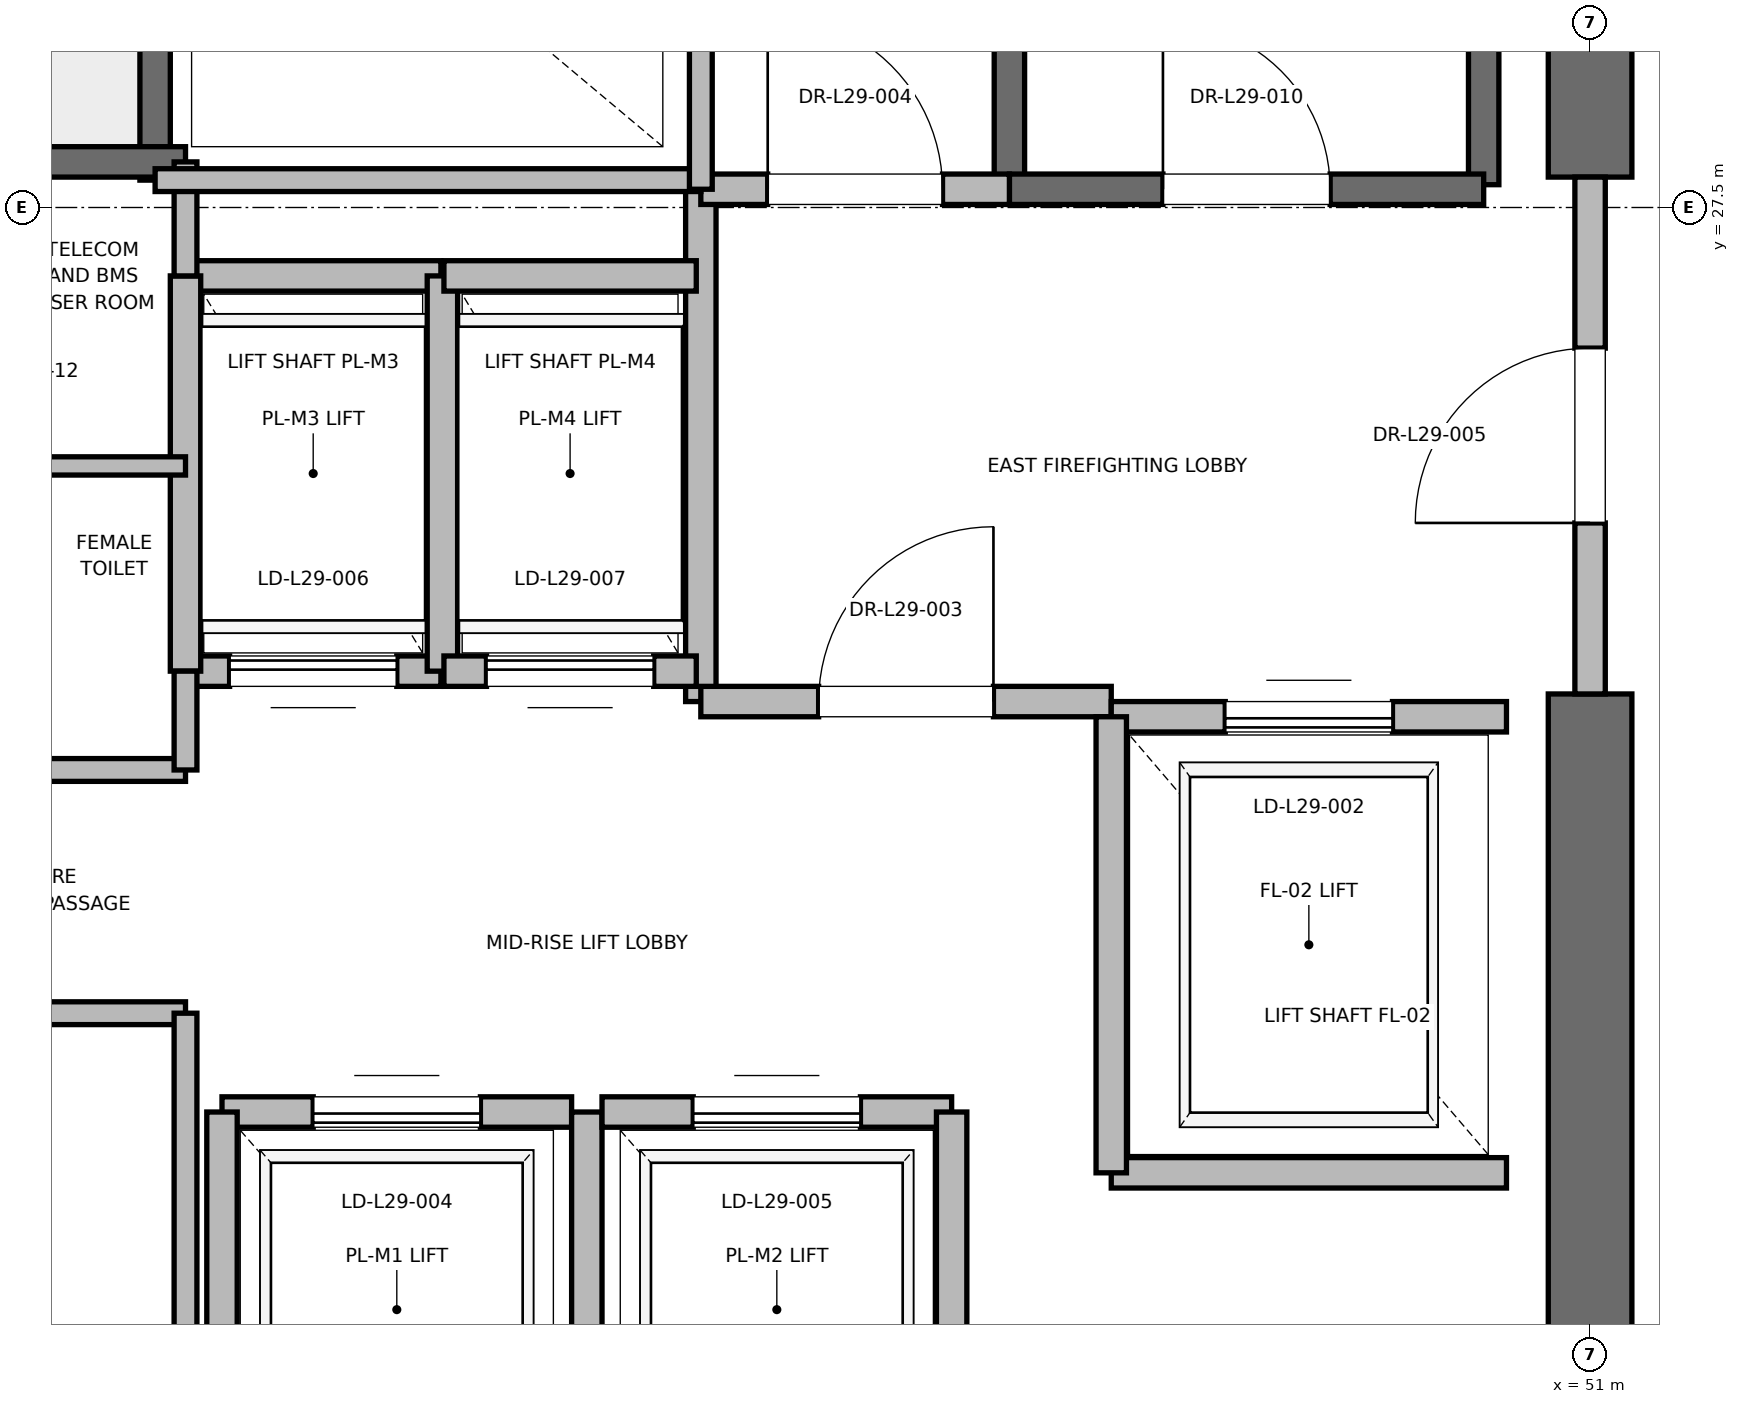
"""IFC4 building model, lengths in metres.
Left out: names, types, materials, properties, quantities, classifications, styles, units other than length and angle.
Written with IfcOpenShell. Run it as: python <this file> out.ifc"""

import sys

from ifc_helpers import new_model, si_unit, direction, frame, frame_2d, origin, place, context, subcontext, project, spatial, rectangle, extrude, element, fill, save


model = new_model("IFC4")
c1 = context("Model", 3, precision=1e-05, world=origin(), true_north=direction((0.0, 1.0)))
c2 = subcontext(c1, "Body", "Model", "MODEL_VIEW")
j1 = project(units=[si_unit("LENGTHUNIT", "METRE"), si_unit("PLANEANGLEUNIT", "RADIAN")], contexts=[c1])
p1 = place(None, origin())
s1 = spatial("IfcSite", under=j1, at=p1, CompositionType="ELEMENT")
p2 = place(p1, origin())
s2 = spatial("IfcBuilding", under=s1, at=p2, CompositionType="ELEMENT")
p3 = place(p2, frame((0.0, 0.0, 128.4)))
s3 = spatial("IfcBuildingStorey", under=s2, at=p3, CompositionType="ELEMENT", Elevation=128.4)
p4 = place(p3, frame((51.0, 18.5, 0.0), z_axis=(0.0, 0.0, 1.0), x_axis=(0.0, 1.0, 0.0)))
e1 = element("IfcWall", 1, at=p4, inside=s3, PredefinedType="SHEAR", context=c2, shape_type="SweptSolid", body=[
    extrude(rectangle(XDim=5.8, YDim=0.55, at=frame_2d((2.9, 0.0))), origin(), (0.0, 0.0, 1.0), 3.775),
])
p5 = place(p3, frame((51.0, 27.7, 0.0), z_axis=(0.0, 0.0, 1.0), x_axis=(0.0, 1.0, 0.0)))
e2 = element("IfcWall", 2, at=p5, inside=s3, PredefinedType="SHEAR", context=c2, shape_type="SweptSolid", body=[
    extrude(rectangle(XDim=8.8, YDim=0.55, at=frame_2d((4.4, 0.0))), origin(), (0.0, 0.0, 1.0), 3.775),
])
p6 = place(p3, frame((50.3, 27.65, 0.0), z_axis=(0.0, 0.0, 1.0), x_axis=(0.0, 1.0, 0.0)))
e3 = element("IfcWall", 3, at=p6, inside=s3, PredefinedType="SOLIDWALL", context=c2, shape_type="SweptSolid", body=[
    extrude(rectangle(XDim=8.15, YDim=0.2, at=frame_2d((4.075, 0.0))), origin(), (0.0, 0.0, 1.0), 3.775),
])
p7 = place(p3, frame((47.18, 27.62, 0.0), z_axis=(0.0, 0.0, 1.0), x_axis=(0.0, 1.0, 0.0)))
e4 = element("IfcWall", 4, at=p7, inside=s3, PredefinedType="SOLIDWALL", context=c2, shape_type="SweptSolid", body=[
    extrude(rectangle(XDim=8.18, YDim=0.2, at=frame_2d((4.09, 0.0))), origin(), (0.0, 0.0, 1.0), 3.775),
])
p8 = place(p3, frame((47.18, 27.62, 0.0), z_axis=(0.0, 0.0, 1.0), x_axis=(1.0, 0.0, 0.0)))
e5 = element("IfcWall", 5, at=p8, inside=s3, PredefinedType="SOLIDWALL", context=c2, shape_type="SweptSolid", body=[
    extrude(rectangle(XDim=3.12, YDim=0.2, at=frame_2d((1.56, 0.0))), origin(), (0.0, 0.0, 1.0), 3.775),
])
p9 = place(p8, frame((1.01, 0.0, 0.0)))
e6 = element("IfcOpeningElement", 6, at=p9, cuts=e5, PredefinedType="OPENING", context=c2, shape_type="SweptSolid", body=[
    extrude(rectangle(XDim=1.1, YDim=2.15, at=frame_2d((0.55, 1.075))), frame((0.0, 0.1, 0.0), z_axis=(0.0, -1.0, 0.0), x_axis=(1.0, 0.0, 0.0)), (0.0, 0.0, 1.0), 0.2),
])
p10 = place(p3, frame((41.56, 27.68, 0.0), z_axis=(0.0, 0.0, 1.0), x_axis=(0.0, 1.0, 0.0)))
e7 = element("IfcWall", 7, at=p10, inside=s3, PredefinedType="SOLIDWALL", context=c2, shape_type="SweptSolid", body=[
    extrude(rectangle(XDim=8.57, YDim=0.2, at=frame_2d((4.285, 0.0))), origin(), (0.0, 0.0, 1.0), 3.775),
])
p11 = place(p3, frame((38.44, 27.8, 0.0), z_axis=(0.0, 0.0, 1.0), x_axis=(1.0, 0.0, 0.0)))
e8 = element("IfcWall", 8, at=p11, inside=s3, PredefinedType="SOLIDWALL", context=c2, shape_type="SweptSolid", body=[
    extrude(rectangle(XDim=3.32, YDim=0.2, at=frame_2d((1.66, 0.0))), origin(), (0.0, 0.0, 1.0), 3.775),
])
p12 = place(p3, frame((45.15, 24.25, 0.0), z_axis=(0.0, 0.0, 1.0), x_axis=(0.0, 1.0, 0.0)))
e9 = element("IfcWall", 9, at=p12, inside=s3, PredefinedType="PARTITIONING", context=c2, shape_type="SweptSolid", body=[
    extrude(rectangle(XDim=3.37, YDim=0.2, at=frame_2d((1.685, 0.0))), origin(), (0.0, 0.0, 1.0), 3.775),
])
p13 = place(p3, frame((45.15, 24.25, 0.0), z_axis=(0.0, 0.0, 1.0), x_axis=(1.0, 0.0, 0.0)))
e10 = element("IfcWall", 10, at=p13, inside=s3, PredefinedType="PARTITIONING", context=c2, shape_type="SweptSolid", body=[
    extrude(rectangle(XDim=2.7, YDim=0.2, at=frame_2d((1.35, 0.0))), origin(), (0.0, 0.0, 1.0), 3.775),
])
p14 = place(p13, frame((0.775, 0.0, 0.0)))
e11 = element("IfcOpeningElement", 11, at=p14, cuts=e10, PredefinedType="OPENING", context=c2, shape_type="SweptSolid", body=[
    extrude(rectangle(XDim=1.15, YDim=2.2, at=frame_2d((0.575, 1.1))), frame((0.0, 0.1, 0.0), z_axis=(0.0, -1.0, 0.0), x_axis=(1.0, 0.0, 0.0)), (0.0, 0.0, 1.0), 0.2),
])
p15 = place(p3, frame((45.15, 27.62, 0.0), z_axis=(0.0, 0.0, 1.0), x_axis=(1.0, 0.0, 0.0)))
e12 = element("IfcWall", 12, at=p15, inside=s3, PredefinedType="PARTITIONING", context=c2, shape_type="SweptSolid", body=[
    extrude(rectangle(XDim=2.03, YDim=0.2, at=frame_2d((1.015, 0.0))), origin(), (0.0, 0.0, 1.0), 3.775),
])
p16 = place(p15, frame((0.44, 0.0, 0.0)))
e13 = element("IfcOpeningElement", 13, at=p16, cuts=e12, PredefinedType="OPENING", context=c2, shape_type="SweptSolid", body=[
    extrude(rectangle(XDim=1.15, YDim=2.2, at=frame_2d((0.575, 1.1))), frame((0.0, 0.1, 0.0), z_axis=(0.0, -1.0, 0.0), x_axis=(1.0, 0.0, 0.0)), (0.0, 0.0, 1.0), 0.2),
])
p17 = place(p3, frame((51.0, 24.3, 0.0), z_axis=(0.0, 0.0, 1.0), x_axis=(0.0, 1.0, 0.0)))
e14 = element("IfcWall", 14, at=p17, inside=s3, PredefinedType="PARTITIONING", context=c2, shape_type="SweptSolid", body=[
    extrude(rectangle(XDim=3.4, YDim=0.2, at=frame_2d((1.7, 0.0))), origin(), (0.0, 0.0, 1.0), 2.755),
])
p18 = place(p17, frame((1.125, 0.0, 0.0)))
e15 = element("IfcOpeningElement", 15, at=p18, cuts=e14, PredefinedType="OPENING", context=c2, shape_type="SweptSolid", body=[
    extrude(rectangle(XDim=1.15, YDim=2.2, at=frame_2d((0.575, 1.1))), frame((0.0, 0.1, 0.0), z_axis=(0.0, -1.0, 0.0), x_axis=(1.0, 0.0, 0.0)), (0.0, 0.0, 1.0), 0.2),
])
p19 = place(p3, frame((47.85, 21.15, 0.0), z_axis=(0.0, 0.0, 1.0), x_axis=(1.0, 0.0, 0.0)))
e16 = element("IfcWall", 16, at=p19, inside=s3, PredefinedType="SOLIDWALL", context=c2, shape_type="SweptSolid", body=[
    extrude(rectangle(XDim=2.6, YDim=0.2, at=frame_2d((1.3, 0.0))), origin(), (0.0, 0.0, 1.0), 3.775),
])
p20 = place(p3, frame((50.45, 24.15, 0.0), z_axis=(0.0, 0.0, 1.0), x_axis=(-1.0, 0.0, 0.0)))
e17 = element("IfcWall", 17, at=p20, inside=s3, PredefinedType="SOLIDWALL", context=c2, shape_type="SweptSolid", body=[
    extrude(rectangle(XDim=2.6, YDim=0.2, at=frame_2d((1.3, 0.0))), origin(), (0.0, 0.0, 1.0), 2.755),
])
p21 = place(p20, frame((0.75, 0.0, 0.0)))
e18 = element("IfcOpeningElement", 18, at=p21, cuts=e17, PredefinedType="OPENING", context=c2, shape_type="SweptSolid", body=[
    extrude(rectangle(XDim=1.1, YDim=2.2, at=frame_2d((0.55, 1.1))), frame((0.0, 0.1, 0.0), z_axis=(0.0, -1.0, 0.0), x_axis=(1.0, 0.0, 0.0)), (0.0, 0.0, 1.0), 0.2),
])
p22 = place(p3, frame((47.85, 24.15, 0.0), z_axis=(0.0, 0.0, 1.0), x_axis=(0.0, -1.0, 0.0)))
e19 = element("IfcWall", 19, at=p22, inside=s3, PredefinedType="SOLIDWALL", context=c2, shape_type="SweptSolid", body=[
    extrude(rectangle(XDim=3.0, YDim=0.2, at=frame_2d((1.5, 0.0))), origin(), (0.0, 0.0, 1.0), 3.775),
])
p23 = place(p3, frame((44.3, 21.55, 0.0), z_axis=(0.0, 0.0, 1.0), x_axis=(-1.0, 0.0, 0.0)))
e20 = element("IfcWall", 20, at=p23, inside=s3, PredefinedType="SOLIDWALL", context=c2, shape_type="SweptSolid", body=[
    extrude(rectangle(XDim=2.3, YDim=0.2, at=frame_2d((1.15, 0.0))), origin(), (0.0, 0.0, 1.0), 3.775),
])
p24 = place(p23, frame((0.6, 0.0, 0.0)))
e21 = element("IfcOpeningElement", 21, at=p24, cuts=e20, PredefinedType="OPENING", context=c2, shape_type="SweptSolid", body=[
    extrude(rectangle(XDim=1.1, YDim=2.2, at=frame_2d((0.55, 1.1))), frame((0.0, 0.1, 0.0), z_axis=(0.0, -1.0, 0.0), x_axis=(1.0, 0.0, 0.0)), (0.0, 0.0, 1.0), 0.2),
])
p25 = place(p3, frame((42.0, 21.55, 0.0), z_axis=(0.0, 0.0, 1.0), x_axis=(0.0, -1.0, 0.0)))
e22 = element("IfcWall", 22, at=p25, inside=s3, PredefinedType="SOLIDWALL", context=c2, shape_type="SweptSolid", body=[
    extrude(rectangle(XDim=2.6, YDim=0.2, at=frame_2d((1.3, 0.0))), origin(), (0.0, 0.0, 1.0), 2.755),
])
p26 = place(p3, frame((44.4, 18.95, 0.0), z_axis=(0.0, 0.0, 1.0), x_axis=(0.0, 1.0, 0.0)))
e23 = element("IfcWall", 23, at=p26, inside=s3, PredefinedType="SOLIDWALL", context=c2, shape_type="SweptSolid", body=[
    extrude(rectangle(XDim=2.6, YDim=0.2, at=frame_2d((1.3, 0.0))), origin(), (0.0, 0.0, 1.0), 3.775),
])
p27 = place(p3, frame((46.8, 21.55, 0.0), z_axis=(0.0, 0.0, 1.0), x_axis=(-1.0, 0.0, 0.0)))
e24 = element("IfcWall", 24, at=p27, inside=s3, PredefinedType="SOLIDWALL", context=c2, shape_type="SweptSolid", body=[
    extrude(rectangle(XDim=2.3, YDim=0.2, at=frame_2d((1.15, 0.0))), origin(), (0.0, 0.0, 1.0), 3.775),
])
p28 = place(p27, frame((0.6, 0.0, 0.0)))
e25 = element("IfcOpeningElement", 25, at=p28, cuts=e24, PredefinedType="OPENING", context=c2, shape_type="SweptSolid", body=[
    extrude(rectangle(XDim=1.1, YDim=2.2, at=frame_2d((0.55, 1.1))), frame((0.0, 0.1, 0.0), z_axis=(0.0, -1.0, 0.0), x_axis=(1.0, 0.0, 0.0)), (0.0, 0.0, 1.0), 0.2),
])
p29 = place(p3, frame((46.8, 18.95, 0.0), z_axis=(0.0, 0.0, 1.0), x_axis=(0.0, 1.0, 0.0)))
e26 = element("IfcWall", 26, at=p29, inside=s3, PredefinedType="SOLIDWALL", context=c2, shape_type="SweptSolid", body=[
    extrude(rectangle(XDim=2.6, YDim=0.2, at=frame_2d((1.3, 0.0))), origin(), (0.0, 0.0, 1.0), 3.775),
])
p30 = place(p3, frame((41.76, 24.45, 0.0), z_axis=(0.0, 0.0, 1.0), x_axis=(1.0, 0.0, 0.0)))
e27 = element("IfcWall", 27, at=p30, inside=s3, PredefinedType="SOLIDWALL", context=c2, shape_type="SweptSolid", body=[
    extrude(rectangle(XDim=1.68, YDim=0.2, at=frame_2d((0.84, 0.0))), origin(), (0.0, 0.0, 1.0), 3.775),
])
p31 = place(p30, frame((0.29, 0.0, 0.0)))
e28 = element("IfcOpeningElement", 28, at=p31, cuts=e27, PredefinedType="OPENING", context=c2, shape_type="SweptSolid", body=[
    extrude(rectangle(XDim=1.1, YDim=2.2, at=frame_2d((0.55, 1.1))), frame((0.0, 0.1, 0.0), z_axis=(0.0, -1.0, 0.0), x_axis=(1.0, 0.0, 0.0)), (0.0, 0.0, 1.0), 0.2),
])
p32 = place(p3, frame((43.44, 27.05, 0.0), z_axis=(0.0, 0.0, 1.0), x_axis=(-1.0, 0.0, 0.0)))
e29 = element("IfcWall", 29, at=p32, inside=s3, PredefinedType="SOLIDWALL", context=c2, shape_type="SweptSolid", body=[
    extrude(rectangle(XDim=1.68, YDim=0.2, at=frame_2d((0.84, 0.0))), origin(), (0.0, 0.0, 1.0), 3.775),
])
for number, where, z_axis, x_axis in (
    (30, (41.76, 27.05, 0.0), (0.0, 0.0, 1.0), (0.0, -1.0, 0.0)),
    (31, (43.45, 24.45, 0.0), (0.0, 0.0, 1.0), (0.0, 1.0, 0.0)),
):
    element("IfcWall", number, at=place(p3, frame(where, z_axis=z_axis, x_axis=x_axis)), inside=s3, PredefinedType="SOLIDWALL", context=c2, shape_type="SweptSolid", body=[
        extrude(rectangle(XDim=2.6, YDim=0.2, at=frame_2d((1.3, 0.0))), origin(), (0.0, 0.0, 1.0), 3.775),
    ])
p33 = place(p3, frame((43.46, 24.45, 0.0), z_axis=(0.0, 0.0, 1.0), x_axis=(1.0, 0.0, 0.0)))
e32 = element("IfcWall", 32, at=p33, inside=s3, PredefinedType="SOLIDWALL", context=c2, shape_type="SweptSolid", body=[
    extrude(rectangle(XDim=1.66, YDim=0.2, at=frame_2d((0.83, 0.0))), origin(), (0.0, 0.0, 1.0), 3.775),
])
p34 = place(p33, frame((0.28, 0.0, 0.0)))
e33 = element("IfcOpeningElement", 33, at=p34, cuts=e32, PredefinedType="OPENING", context=c2, shape_type="SweptSolid", body=[
    extrude(rectangle(XDim=1.1, YDim=2.2, at=frame_2d((0.55, 1.1))), frame((0.0, 0.1, 0.0), z_axis=(0.0, -1.0, 0.0), x_axis=(1.0, 0.0, 0.0)), (0.0, 0.0, 1.0), 0.2),
])
p35 = place(p3, frame((45.12, 27.05, 0.0), z_axis=(0.0, 0.0, 1.0), x_axis=(-1.0, 0.0, 0.0)))
e34 = element("IfcWall", 34, at=p35, inside=s3, PredefinedType="SOLIDWALL", context=c2, shape_type="SweptSolid", body=[
    extrude(rectangle(XDim=1.66, YDim=0.2, at=frame_2d((0.83, 0.0))), origin(), (0.0, 0.0, 1.0), 3.775),
])
for number, where, z_axis, x_axis in (
    (35, (39.95, 22.2, 0.0), (0.0, 0.0, 1.0), (1.0, 0.0, 0.0)),
    (36, (39.95, 23.8, 0.0), (0.0, 0.0, 1.0), (1.0, 0.0, 0.0)),
):
    element("IfcWall", number, at=place(p3, frame(where, z_axis=z_axis, x_axis=x_axis)), inside=s3, PredefinedType="PARTITIONING", context=c2, shape_type="SweptSolid", body=[
        extrude(rectangle(XDim=1.81, YDim=0.15, at=frame_2d((0.905, 0.0))), origin(), (0.0, 0.0, 1.0), 2.85),
    ])
p36 = place(p3, frame((39.95, 25.8, 0.0), z_axis=(0.0, 0.0, 1.0), x_axis=(1.0, 0.0, 0.0)))
e37 = element("IfcWall", 37, at=p36, inside=s3, PredefinedType="PARTITIONING", context=c2, shape_type="SweptSolid", body=[
    extrude(rectangle(XDim=1.81, YDim=0.12, at=frame_2d((0.905, 0.0))), origin(), (0.0, 0.0, 1.0), 2.85),
])
p37 = place(p3, frame((41.76, 18.6, 0.0), z_axis=(0.0, 0.0, 1.0), x_axis=(0.0, 1.0, 0.0)))
e38 = element("IfcWall", 38, at=p37, inside=s3, PredefinedType="PARTITIONING", context=c2, shape_type="SweptSolid", body=[
    extrude(rectangle(XDim=3.6, YDim=0.15, at=frame_2d((1.8, 0.0))), origin(), (0.0, 0.0, 1.0), 2.755),
])
p38 = place(p3, frame((41.76, 23.8, 0.0), z_axis=(0.0, 0.0, 1.0), x_axis=(0.0, 1.0, 0.0)))
e39 = element("IfcWall", 39, at=p38, inside=s3, PredefinedType="PARTITIONING", context=c2, shape_type="SweptSolid", body=[
    extrude(rectangle(XDim=0.65, YDim=0.15, at=frame_2d((0.325, 0.0))), origin(), (0.0, 0.0, 1.0), 2.85),
])
p39 = place(p3, frame((41.76, 27.05, 0.0), z_axis=(0.0, 0.0, 1.0), x_axis=(0.0, 1.0, 0.0)))
e40 = element("IfcWall", 40, at=p39, inside=s3, PredefinedType="PARTITIONING", context=c2, shape_type="SweptSolid", body=[
    extrude(rectangle(XDim=0.75, YDim=0.15, at=frame_2d((0.375, 0.0))), origin(), (0.0, 0.0, 1.0), 2.85),
])
p40 = place(p3, frame((41.56, 27.68, 0.0), z_axis=(0.0, 0.0, 1.0), x_axis=(1.0, 0.0, 0.0)))
e41 = element("IfcWall", 41, at=p40, inside=s3, PredefinedType="PARTITIONING", context=c2, shape_type="SweptSolid", body=[
    extrude(rectangle(XDim=3.59, YDim=0.15, at=frame_2d((1.795, 0.0))), origin(), (0.0, 0.0, 1.0), 2.85),
])
p41 = place(p3, frame((45.15, 27.62, 0.0), z_axis=(0.0, 0.0, 1.0), x_axis=(0.0, 1.0, 0.0)))
e42 = element("IfcWall", 42, at=p41, inside=s3, PredefinedType="PARTITIONING", context=c2, shape_type="SweptSolid", body=[
    extrude(rectangle(XDim=3.1, YDim=0.15, at=frame_2d((1.55, 0.0))), origin(), (0.0, 0.0, 1.0), 2.85),
])
p42 = place(p9, origin())
e43 = element("IfcDoor", 43, at=p42, inside=s3, OperationType="SINGLE_SWING_LEFT", PredefinedType="DOOR", context=c2, shape_type="SweptSolid", body=[
    extrude(rectangle(XDim=1.1, YDim=2.15, at=frame_2d((0.55, 1.075))), frame((0.0, 0.025, 0.0), z_axis=(0.0, -1.0, 0.0), x_axis=(1.0, 0.0, 0.0)), (0.0, 0.0, 1.0), 0.05),
])
fill(e6, e43)
p43 = place(p14, origin())
e44 = element("IfcDoor", 44, at=p43, inside=s3, OperationType="SINGLE_SWING_RIGHT", PredefinedType="DOOR", context=c2, shape_type="SweptSolid", body=[
    extrude(rectangle(XDim=1.15, YDim=2.2, at=frame_2d((0.575, 1.1))), frame((0.0, 0.025, 0.0), z_axis=(0.0, -1.0, 0.0), x_axis=(1.0, 0.0, 0.0)), (0.0, 0.0, 1.0), 0.05),
])
fill(e11, e44)
p44 = place(p16, origin())
e45 = element("IfcDoor", 45, at=p44, inside=s3, OperationType="SINGLE_SWING_LEFT", PredefinedType="DOOR", context=c2, shape_type="SweptSolid", body=[
    extrude(rectangle(XDim=1.15, YDim=2.2, at=frame_2d((0.575, 1.1))), frame((0.0, 0.025, 0.0), z_axis=(0.0, -1.0, 0.0), x_axis=(1.0, 0.0, 0.0)), (0.0, 0.0, 1.0), 0.05),
])
fill(e13, e45)
p45 = place(p18, origin())
e46 = element("IfcDoor", 46, at=p45, inside=s3, OperationType="SINGLE_SWING_LEFT", PredefinedType="DOOR", context=c2, shape_type="SweptSolid", body=[
    extrude(rectangle(XDim=1.15, YDim=2.2, at=frame_2d((0.575, 1.1))), frame((0.0, 0.025, 0.0), z_axis=(0.0, -1.0, 0.0), x_axis=(1.0, 0.0, 0.0)), (0.0, 0.0, 1.0), 0.05),
])
fill(e15, e46)
p46 = place(p21, origin())
e47 = element("IfcDoor", 47, at=p46, inside=s3, OperationType="SLIDING_TO_RIGHT", PredefinedType="DOOR", context=c2, shape_type="SweptSolid", body=[
    extrude(rectangle(XDim=1.1, YDim=2.2, at=frame_2d((0.55, 1.1))), frame((0.0, 0.025, 0.0), z_axis=(0.0, -1.0, 0.0), x_axis=(1.0, 0.0, 0.0)), (0.0, 0.0, 1.0), 0.05),
])
fill(e18, e47)
p47 = place(p24, origin())
e48 = element("IfcDoor", 48, at=p47, inside=s3, OperationType="SLIDING_TO_RIGHT", PredefinedType="DOOR", context=c2, shape_type="SweptSolid", body=[
    extrude(rectangle(XDim=1.1, YDim=2.2, at=frame_2d((0.55, 1.1))), frame((0.0, 0.025, 0.0), z_axis=(0.0, -1.0, 0.0), x_axis=(1.0, 0.0, 0.0)), (0.0, 0.0, 1.0), 0.05),
])
fill(e21, e48)
p48 = place(p28, origin())
e49 = element("IfcDoor", 49, at=p48, inside=s3, OperationType="SLIDING_TO_RIGHT", PredefinedType="DOOR", context=c2, shape_type="SweptSolid", body=[
    extrude(rectangle(XDim=1.1, YDim=2.2, at=frame_2d((0.55, 1.1))), frame((0.0, 0.025, 0.0), z_axis=(0.0, -1.0, 0.0), x_axis=(1.0, 0.0, 0.0)), (0.0, 0.0, 1.0), 0.05),
])
fill(e25, e49)
p49 = place(p31, origin())
e50 = element("IfcDoor", 50, at=p49, inside=s3, OperationType="SLIDING_TO_RIGHT", PredefinedType="DOOR", context=c2, shape_type="SweptSolid", body=[
    extrude(rectangle(XDim=1.1, YDim=2.2, at=frame_2d((0.55, 1.1))), frame((0.0, 0.025, 0.0), z_axis=(0.0, -1.0, 0.0), x_axis=(1.0, 0.0, 0.0)), (0.0, 0.0, 1.0), 0.05),
])
fill(e28, e50)
p50 = place(p34, origin())
e51 = element("IfcDoor", 51, at=p50, inside=s3, OperationType="SLIDING_TO_RIGHT", PredefinedType="DOOR", context=c2, shape_type="SweptSolid", body=[
    extrude(rectangle(XDim=1.1, YDim=2.2, at=frame_2d((0.55, 1.1))), frame((0.0, 0.025, 0.0), z_axis=(0.0, -1.0, 0.0), x_axis=(1.0, 0.0, 0.0)), (0.0, 0.0, 1.0), 0.05),
])
fill(e33, e51)
save(model, sys.argv[1])
